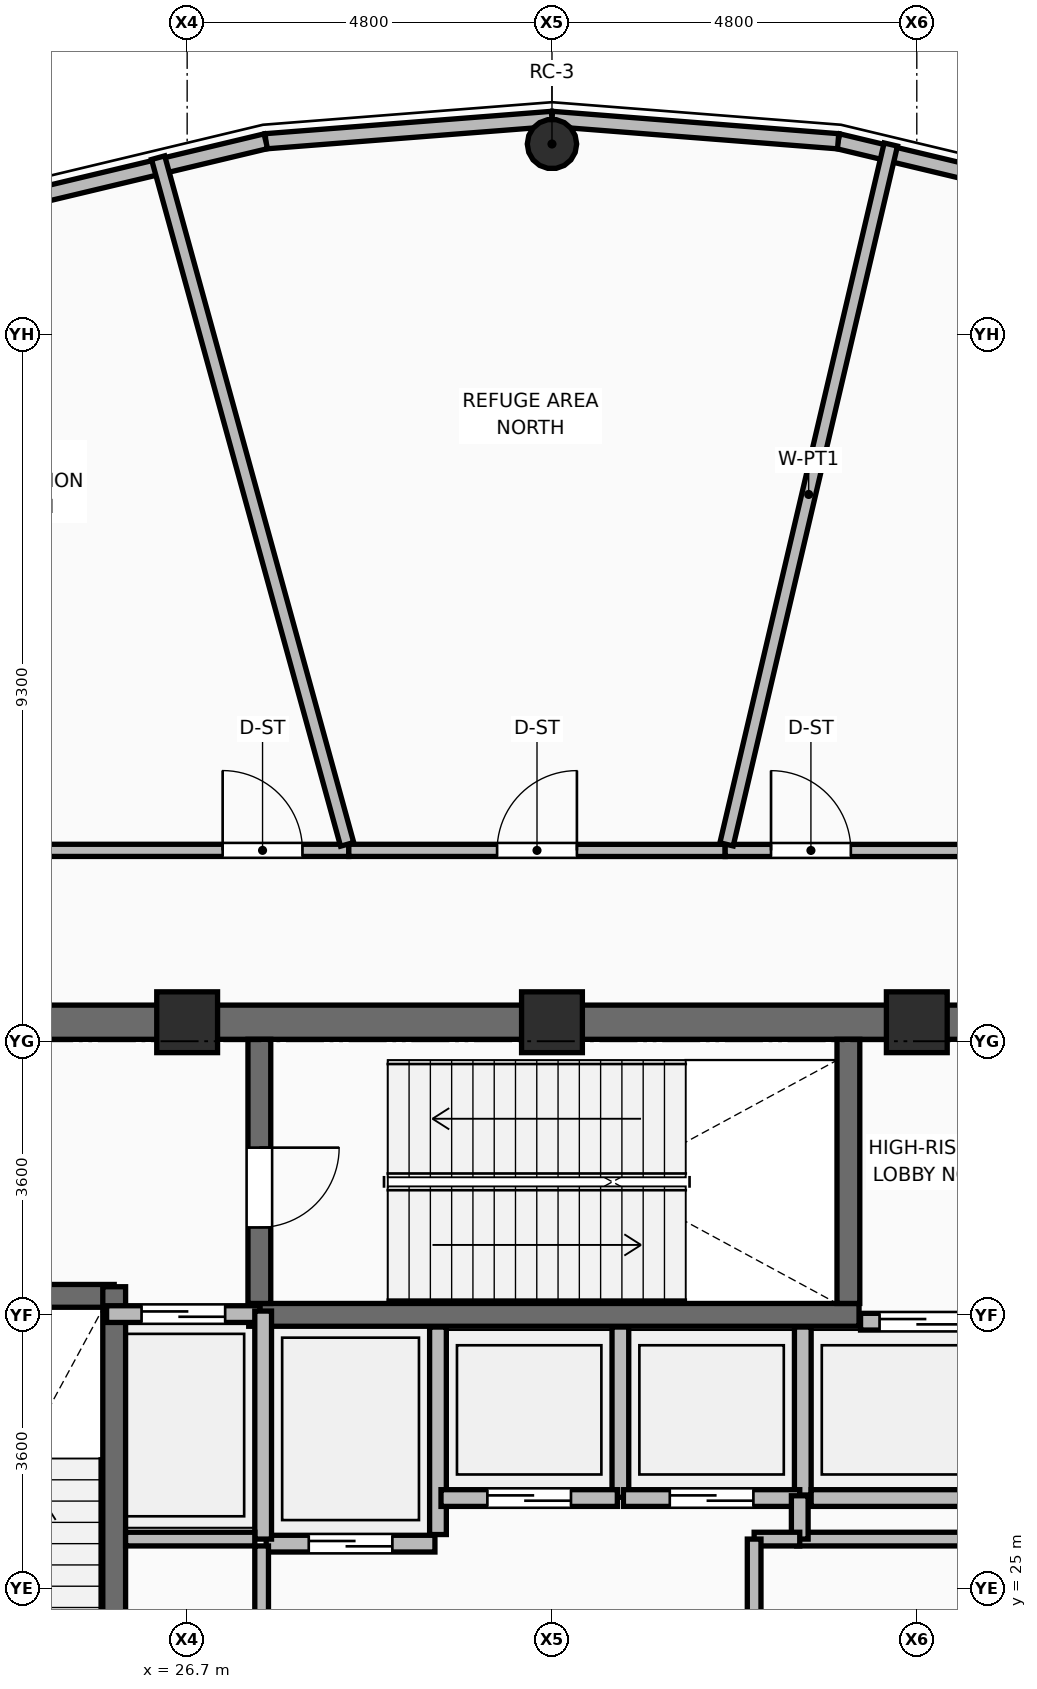
"""IFC4 building model, lengths in metres.
Left out: names, types, materials, properties, quantities, classifications, styles, units other than length and angle.
Written with IfcOpenShell. Run it as: python <this file> out.ifc"""

import sys

from ifc_helpers import new_model, si_unit, direction, frame, frame_2d, origin, origin_2d, place, context, subcontext, project, spatial, rectangle, hollow_circle, extrude, element, fill, save


model = new_model("IFC4")
c1 = context("Model", 3, precision=1e-05, world=origin(), true_north=direction((0.0, 1.0)))
c2 = subcontext(c1, "Body", "Model", "MODEL_VIEW")
j1 = project(units=[si_unit("LENGTHUNIT", "METRE"), si_unit("PLANEANGLEUNIT", "RADIAN")], contexts=[c1])
p1 = place(None, origin())
s1 = spatial("IfcSite", under=j1, at=p1, CompositionType="ELEMENT")
p2 = place(p1, origin())
s2 = spatial("IfcBuilding", under=s1, at=p2, CompositionType="ELEMENT")
p3 = place(p2, frame((0.0, 0.0, 253.65)))
s3 = spatial("IfcBuildingStorey", under=s2, at=p3, CompositionType="ELEMENT", Elevation=253.65)
for number, where, z_axis, x_axis in (
    (1, (26.7, 32.45, 0.0), (0.0, 0.0, 1.0), (1.0, 0.0, 0.0)),
    (2, (31.5, 32.45, 0.0), (0.0, 0.0, 1.0), (1.0, 0.0, 0.0)),
    (3, (36.3, 32.45, 0.0), (0.0, 0.0, 1.0), (1.0, 0.0, 0.0)),
):
    element("IfcColumn", number, at=place(p3, frame(where, z_axis=z_axis, x_axis=x_axis)), inside=s3, PredefinedType="COLUMN", context=c2, shape_type="SweptSolid", body=[
        extrude(rectangle(XDim=0.8, YDim=0.8, at=origin_2d()), origin(), (0.0, 0.0, 1.0), 5.4),
    ])
p4 = place(p3, frame((31.5, 44.004, 0.0), z_axis=(0.0, -0.232870617918, 0.972507725065), x_axis=(1.0, 0.0, 0.0)))
e4 = element("IfcColumn", 4, at=p4, inside=s3, PredefinedType="COLUMN", context=c2, shape_type="SweptSolid", body=[
    extrude(hollow_circle(Radius=0.325, WallThickness=0.03, at=origin_2d()), origin(), (0.0, 0.0, 1.0), 5.368),
])
p5 = place(p3, frame((30.0, 25.71, 0.0), z_axis=(0.0, 0.0, 1.0), x_axis=(0.0, 1.0, 0.0)))
e5 = element("IfcWall", 5, at=p5, inside=s3, PredefinedType="PARTITIONING", context=c2, shape_type="SweptSolid", body=[
    extrude(rectangle(XDim=2.73, YDim=0.22, at=frame_2d((1.365, 0.0))), origin(), (0.0, 0.0, 1.0), 5.195),
])
p6 = place(p3, frame((32.4, 26.2, 0.0), z_axis=(0.0, 0.0, 1.0), x_axis=(0.0, 1.0, 0.0)))
e6 = element("IfcWall", 6, at=p6, inside=s3, PredefinedType="PARTITIONING", context=c2, shape_type="SweptSolid", body=[
    extrude(rectangle(XDim=2.24, YDim=0.22, at=frame_2d((1.12, 0.0))), origin(), (0.0, 0.0, 1.0), 5.195),
])
p7 = place(p3, frame((34.8, 26.23, 0.0), z_axis=(0.0, 0.0, 1.0), x_axis=(0.0, 1.0, 0.0)))
e7 = element("IfcWall", 7, at=p7, inside=s3, PredefinedType="PARTITIONING", context=c2, shape_type="SweptSolid", body=[
    extrude(rectangle(XDim=2.21, YDim=0.22, at=frame_2d((1.105, 0.0))), origin(), (0.0, 0.0, 1.0), 5.195),
])
p8 = place(p3, frame((34.91, 26.19, 0.0), z_axis=(0.0, 0.0, 1.0), x_axis=(1.0, 0.0, 0.0)))
e8 = element("IfcWall", 8, at=p8, inside=s3, PredefinedType="PARTITIONING", context=c2, shape_type="SweptSolid", body=[
    extrude(rectangle(XDim=2.14, YDim=0.22, at=frame_2d((1.07, 0.0))), origin(), (0.0, 0.0, 1.0), 5.195),
])
p9 = place(p3, frame((38.915, 43.168, 0.0), z_axis=(0.0, 0.0, 1.0), x_axis=(-0.972626535049, 0.23237388691, 0.0)))
e9 = element("IfcWall", 9, at=p9, inside=s3, PredefinedType="PARAPET", context=c2, shape_type="SweptSolid", body=[
    extrude(rectangle(XDim=3.753, YDim=0.2, at=frame_2d((1.876, 0.0))), origin(), (0.0, 0.0, 1.0), 1.12),
])
for number, where, z_axis, x_axis in (
    (10, (35.265, 44.04, 0.0), (0.0, 0.0, 1.0), (-0.997, 0.078, 0.0)),
    (11, (31.5, 44.334, 0.0), (0.0, 0.0, 1.0), (-0.997, -0.078, 0.0)),
):
    element("IfcWall", number, at=place(p3, frame(where, z_axis=z_axis, x_axis=x_axis)), inside=s3, PredefinedType="PARAPET", context=c2, shape_type="SweptSolid", body=[
        extrude(rectangle(XDim=3.776, YDim=0.2, at=frame_2d((1.888, 0.0))), origin(), (0.0, 0.0, 1.0), 1.12),
    ])
p10 = place(p3, frame((27.735, 44.04, 0.0), z_axis=(0.0, 0.0, 1.0), x_axis=(-0.972626535049, -0.23237388691, 0.0)))
e12 = element("IfcWall", 12, at=p10, inside=s3, PredefinedType="PARAPET", context=c2, shape_type="SweptSolid", body=[
    extrude(rectangle(XDim=3.753, YDim=0.2, at=frame_2d((1.876, 0.0))), origin(), (0.0, 0.0, 1.0), 1.12),
])
p11 = place(p3, frame((21.675, 32.45, 0.0), z_axis=(0.0, 0.0, 1.0), x_axis=(1.0, 0.0, 0.0)))
e13 = element("IfcWall", 13, at=p11, inside=s3, PredefinedType="SHEAR", context=c2, shape_type="SweptSolid", body=[
    extrude(rectangle(XDim=19.65, YDim=0.45, at=frame_2d((9.825, 0.0))), origin(), (0.0, 0.0, 1.0), 5.22),
])
p12 = place(p11, frame((2.075, 0.0, 0.0)))
e14 = element("IfcOpeningElement", 14, at=p12, cuts=e13, PredefinedType="OPENING", context=c2, shape_type="SweptSolid", body=[
    extrude(rectangle(XDim=1.1, YDim=2.1, at=frame_2d((0.55, 1.05))), frame((0.0, 0.235, 0.0), z_axis=(0.0, -1.0, 0.0), x_axis=(1.0, 0.0, 0.0)), (0.0, 0.0, 1.0), 0.47),
])
p13 = place(p11, frame((15.465, 0.0, 0.0)))
e15 = element("IfcOpeningElement", 15, at=p13, cuts=e13, PredefinedType="OPENING", context=c2, shape_type="SweptSolid", body=[
    extrude(rectangle(XDim=1.0, YDim=2.1, at=frame_2d((0.5, 1.05))), frame((0.0, 0.235, 0.0), z_axis=(0.0, -1.0, 0.0), x_axis=(1.0, 0.0, 0.0)), (0.0, 0.0, 1.0), 0.47),
])
p14 = place(p11, frame((17.475, 0.0, 0.0)))
e16 = element("IfcOpeningElement", 16, at=p14, cuts=e13, PredefinedType="OPENING", context=c2, shape_type="SweptSolid", body=[
    extrude(rectangle(XDim=0.9, YDim=2.1, at=frame_2d((0.45, 1.05))), frame((0.0, 0.235, 0.0), z_axis=(0.0, -1.0, 0.0), x_axis=(1.0, 0.0, 0.0)), (0.0, 0.0, 1.0), 0.47),
])
p15 = place(p3, frame((22.125, 28.85, 0.0), z_axis=(0.0, 0.0, 1.0), x_axis=(1.0, 0.0, 0.0)))
e17 = element("IfcWall", 17, at=p15, inside=s3, PredefinedType="SHEAR", context=c2, shape_type="SweptSolid", body=[
    extrude(rectangle(XDim=3.615, YDim=0.3, at=frame_2d((1.808, 0.0))), origin(), (0.0, 0.0, 1.0), 5.22),
])
p16 = place(p3, frame((25.74, 20.98, 0.0), z_axis=(0.0, 0.0, 1.0), x_axis=(0.0, 1.0, 0.0)))
e18 = element("IfcWall", 18, at=p16, inside=s3, PredefinedType="SHEAR", context=c2, shape_type="SweptSolid", body=[
    extrude(rectangle(XDim=7.99, YDim=0.3, at=frame_2d((3.995, 0.0))), origin(), (0.0, 0.0, 1.0), 5.22),
])
p17 = place(p3, frame((27.51, 28.6, 0.0), z_axis=(0.0, 0.0, 1.0), x_axis=(1.0, 0.0, 0.0)))
e19 = element("IfcWall", 19, at=p17, inside=s3, PredefinedType="SHEAR", context=c2, shape_type="SweptSolid", body=[
    extrude(rectangle(XDim=8.03, YDim=0.3, at=frame_2d((4.015, 0.0))), origin(), (0.0, 0.0, 1.0), 5.22),
])
p18 = place(p3, frame((27.65, 28.75, 0.0), z_axis=(0.0, 0.0, 1.0), x_axis=(0.0, 1.0, 0.0)))
e20 = element("IfcWall", 20, at=p18, inside=s3, PredefinedType="SHEAR", context=c2, shape_type="SweptSolid", body=[
    extrude(rectangle(XDim=3.475, YDim=0.3, at=frame_2d((1.738, 0.0))), origin(), (0.0, 0.0, 1.0), 5.22),
])
p19 = place(p18, frame((1.0, 0.0, 0.0)))
e21 = element("IfcOpeningElement", 21, at=p19, cuts=e20, PredefinedType="OPENING", context=c2, shape_type="SweptSolid", body=[
    extrude(rectangle(XDim=1.05, YDim=2.1, at=frame_2d((0.525, 1.05))), frame((0.0, 0.16, 0.0), z_axis=(0.0, -1.0, 0.0), x_axis=(1.0, 0.0, 0.0)), (0.0, 0.0, 1.0), 0.32),
])
p20 = place(p3, frame((35.4, 28.75, 0.0), z_axis=(0.0, 0.0, 1.0), x_axis=(0.0, 1.0, 0.0)))
e22 = element("IfcWall", 22, at=p20, inside=s3, PredefinedType="SHEAR", context=c2, shape_type="SweptSolid", body=[
    extrude(rectangle(XDim=3.475, YDim=0.3, at=frame_2d((1.738, 0.0))), origin(), (0.0, 0.0, 1.0), 5.22),
])
p21 = place(p3, frame((25.64, 28.61, 0.0), z_axis=(0.0, 0.0, 1.0), x_axis=(1.0, 0.0, 0.0)))
e23 = element("IfcWall", 23, at=p21, inside=s3, PredefinedType="PARTITIONING", context=c2, shape_type="SweptSolid", body=[
    extrude(rectangle(XDim=2.02, YDim=0.22, at=frame_2d((1.01, 0.0))), origin(), (0.0, 0.0, 1.0), 5.2),
])
p22 = place(p21, frame((0.46, 0.0, 0.0)))
e24 = element("IfcOpeningElement", 24, at=p22, cuts=e23, PredefinedType="OPENING", context=c2, shape_type="SweptSolid", body=[
    extrude(rectangle(XDim=1.1, YDim=2.2, at=frame_2d((0.55, 1.1))), frame((0.0, 0.12, 0.0), z_axis=(0.0, -1.0, 0.0), x_axis=(1.0, 0.0, 0.0)), (0.0, 0.0, 1.0), 0.24),
])
p23 = place(p3, frame((27.74, 25.59, 0.0), z_axis=(0.0, 0.0, 1.0), x_axis=(1.0, 0.0, 0.0)))
e25 = element("IfcWall", 25, at=p23, inside=s3, PredefinedType="PARTITIONING", context=c2, shape_type="SweptSolid", body=[
    extrude(rectangle(XDim=2.22, YDim=0.22, at=frame_2d((1.11, 0.0))), origin(), (0.0, 0.0, 1.0), 5.2),
])
p24 = place(p23, frame((0.56, 0.0, 0.0)))
e26 = element("IfcOpeningElement", 26, at=p24, cuts=e25, PredefinedType="OPENING", context=c2, shape_type="SweptSolid", body=[
    extrude(rectangle(XDim=1.1, YDim=2.2, at=frame_2d((0.55, 1.1))), frame((0.0, 0.12, 0.0), z_axis=(0.0, -1.0, 0.0), x_axis=(1.0, 0.0, 0.0)), (0.0, 0.0, 1.0), 0.24),
])
p25 = place(p3, frame((30.04, 26.19, 0.0), z_axis=(0.0, 0.0, 1.0), x_axis=(1.0, 0.0, 0.0)))
e27 = element("IfcWall", 27, at=p25, inside=s3, PredefinedType="PARTITIONING", context=c2, shape_type="SweptSolid", body=[
    extrude(rectangle(XDim=2.32, YDim=0.22, at=frame_2d((1.16, 0.0))), origin(), (0.0, 0.0, 1.0), 5.2),
])
p26 = place(p25, frame((0.61, 0.0, 0.0)))
e28 = element("IfcOpeningElement", 28, at=p26, cuts=e27, PredefinedType="OPENING", context=c2, shape_type="SweptSolid", body=[
    extrude(rectangle(XDim=1.1, YDim=2.2, at=frame_2d((0.55, 1.1))), frame((0.0, 0.12, 0.0), z_axis=(0.0, -1.0, 0.0), x_axis=(1.0, 0.0, 0.0)), (0.0, 0.0, 1.0), 0.24),
])
p27 = place(p3, frame((32.44, 26.19, 0.0), z_axis=(0.0, 0.0, 1.0), x_axis=(1.0, 0.0, 0.0)))
e29 = element("IfcWall", 29, at=p27, inside=s3, PredefinedType="PARTITIONING", context=c2, shape_type="SweptSolid", body=[
    extrude(rectangle(XDim=2.32, YDim=0.22, at=frame_2d((1.16, 0.0))), origin(), (0.0, 0.0, 1.0), 5.2),
])
p28 = place(p27, frame((0.61, 0.0, 0.0)))
e30 = element("IfcOpeningElement", 30, at=p28, cuts=e29, PredefinedType="OPENING", context=c2, shape_type="SweptSolid", body=[
    extrude(rectangle(XDim=1.1, YDim=2.2, at=frame_2d((0.55, 1.1))), frame((0.0, 0.12, 0.0), z_axis=(0.0, -1.0, 0.0), x_axis=(1.0, 0.0, 0.0)), (0.0, 0.0, 1.0), 0.24),
])
p29 = place(p3, frame((35.56, 28.51, 0.0), z_axis=(0.0, 0.0, 1.0), x_axis=(1.0, 0.0, 0.0)))
e31 = element("IfcWall", 31, at=p29, inside=s3, PredefinedType="PARTITIONING", context=c2, shape_type="SweptSolid", body=[
    extrude(rectangle(XDim=1.6, YDim=0.22, at=frame_2d((0.8, 0.0))), origin(), (0.0, 0.0, 1.0), 5.2),
])
p30 = place(p29, frame((0.25, 0.0, 0.0)))
e32 = element("IfcOpeningElement", 32, at=p30, cuts=e31, PredefinedType="OPENING", context=c2, shape_type="SweptSolid", body=[
    extrude(rectangle(XDim=1.1, YDim=2.2, at=frame_2d((0.55, 1.1))), frame((0.0, 0.12, 0.0), z_axis=(0.0, -1.0, 0.0), x_axis=(1.0, 0.0, 0.0)), (0.0, 0.0, 1.0), 0.24),
])
p31 = place(p3, frame((27.7, 25.65, 0.0), z_axis=(0.0, 0.0, 1.0), x_axis=(0.0, 1.0, 0.0)))
e33 = element("IfcWall", 33, at=p31, inside=s3, PredefinedType="PARTITIONING", context=c2, shape_type="SweptSolid", body=[
    extrude(rectangle(XDim=3.0, YDim=0.22, at=frame_2d((1.5, 0.0))), origin(), (0.0, 0.0, 1.0), 5.2),
])
p32 = place(p3, frame((25.89, 25.65, 0.0), z_axis=(0.0, 0.0, 1.0), x_axis=(1.0, 0.0, 0.0)))
e34 = element("IfcWall", 34, at=p32, inside=s3, PredefinedType="PARTITIONING", context=c2, shape_type="SweptSolid", body=[
    extrude(rectangle(XDim=1.7, YDim=0.18, at=frame_2d((0.85, 0.0))), origin(), (0.0, 0.0, 1.0), 5.2),
])
p33 = place(p3, frame((27.68, 24.16, 0.0), z_axis=(0.0, 0.0, 1.0), x_axis=(0.0, 1.0, 0.0)))
e35 = element("IfcWall", 35, at=p33, inside=s3, PredefinedType="PARTITIONING", context=c2, shape_type="SweptSolid", body=[
    extrude(rectangle(XDim=1.4, YDim=0.18, at=frame_2d((0.7, 0.0))), origin(), (0.0, 0.0, 1.0), 5.2),
])
p34 = place(p3, frame((34.72, 25.65, 0.0), z_axis=(0.0, 0.0, 1.0), x_axis=(1.0, 0.0, 0.0)))
e36 = element("IfcWall", 36, at=p34, inside=s3, PredefinedType="PARTITIONING", context=c2, shape_type="SweptSolid", body=[
    extrude(rectangle(XDim=2.34, YDim=0.18, at=frame_2d((1.17, 0.0))), origin(), (0.0, 0.0, 1.0), 5.2),
])
p35 = place(p3, frame((34.76, 25.65, 0.0), z_axis=(0.0, 0.0, 1.0), x_axis=(0.0, 1.0, 0.0)))
e37 = element("IfcWall", 37, at=p35, inside=s3, PredefinedType="PARTITIONING", context=c2, shape_type="SweptSolid", body=[
    extrude(rectangle(XDim=0.57, YDim=0.22, at=frame_2d((0.285, 0.0))), origin(), (0.0, 0.0, 1.0), 5.2),
])
p36 = place(p3, frame((34.16, 25.65, 0.0), z_axis=(0.0, 0.0, 1.0), x_axis=(1.0, 0.0, 0.0)))
e38 = element("IfcWall", 38, at=p36, inside=s3, PredefinedType="PARTITIONING", context=c2, shape_type="SweptSolid", body=[
    extrude(rectangle(XDim=0.6, YDim=0.18, at=frame_2d((0.3, 0.0))), origin(), (0.0, 0.0, 1.0), 5.2),
])
p37 = place(p3, frame((34.16, 21.1, 0.0), z_axis=(0.0, 0.0, 1.0), x_axis=(0.0, 1.0, 0.0)))
e39 = element("IfcWall", 39, at=p37, inside=s3, PredefinedType="PARTITIONING", context=c2, shape_type="SweptSolid", body=[
    extrude(rectangle(XDim=4.55, YDim=0.18, at=frame_2d((2.275, 0.0))), origin(), (0.0, 0.0, 1.0), 5.2),
])
p38 = place(p37, frame((1.825, 0.0, 0.0)))
e40 = element("IfcOpeningElement", 40, at=p38, cuts=e39, PredefinedType="OPENING", context=c2, shape_type="SweptSolid", body=[
    extrude(rectangle(XDim=0.9, YDim=2.1, at=frame_2d((0.45, 1.05))), frame((0.0, 0.1, 0.0), z_axis=(0.0, -1.0, 0.0), x_axis=(1.0, 0.0, 0.0)), (0.0, 0.0, 1.0), 0.2),
])
p39 = place(p3, frame((23.711, 34.711, 0.0), z_axis=(0.0, 0.0, 1.0), x_axis=(1.0, 0.0, 0.0)))
e41 = element("IfcWall", 41, at=p39, inside=s3, PredefinedType="PARTITIONING", context=c2, shape_type="SweptSolid", body=[
    extrude(rectangle(XDim=5.116, YDim=0.16, at=frame_2d((2.558, 0.0))), origin(), (0.0, 0.0, 1.0), 5.2),
])
p40 = place(p39, frame((3.456, 0.0, 0.0)))
e42 = element("IfcOpeningElement", 42, at=p40, cuts=e41, PredefinedType="OPENING", context=c2, shape_type="SweptSolid", body=[
    extrude(rectangle(XDim=1.05, YDim=2.1, at=frame_2d((0.525, 1.05))), frame((0.0, 0.09, 0.0), z_axis=(0.0, -1.0, 0.0), x_axis=(1.0, 0.0, 0.0)), (0.0, 0.0, 1.0), 0.18),
])
p41 = place(p3, frame((28.827, 34.711, 0.0), z_axis=(0.0, 0.0, 1.0), x_axis=(0.999999980556, -0.00019719976, 0.0)))
e43 = element("IfcWall", 43, at=p41, inside=s3, PredefinedType="PARTITIONING", context=c2, shape_type="SweptSolid", body=[
    extrude(rectangle(XDim=4.952, YDim=0.16, at=frame_2d((2.476, 0.0))), origin(), (0.0, 0.0, 1.0), 4.733),
])
p42 = place(p41, frame((1.951, 0.0, 0.0)))
e44 = element("IfcOpeningElement", 44, at=p42, cuts=e43, PredefinedType="OPENING", context=c2, shape_type="SweptSolid", body=[
    extrude(rectangle(XDim=1.05, YDim=2.1, at=frame_2d((0.525, 1.05))), frame((0.0, 0.09, 0.0), z_axis=(0.0, -1.0, 0.0), x_axis=(1.0, 0.0, 0.0)), (0.0, 0.0, 1.0), 0.18),
])
p43 = place(p3, frame((33.779, 34.71, 0.0), z_axis=(0.0, 0.0, 1.0), x_axis=(0.999999984288, -0.000177265674, 0.0)))
e45 = element("IfcWall", 45, at=p43, inside=s3, PredefinedType="PARTITIONING", context=c2, shape_type="SweptSolid", body=[
    extrude(rectangle(XDim=5.509, YDim=0.16, at=frame_2d((2.754, 0.0))), origin(), (0.0, 0.0, 1.0), 5.2),
])
p44 = place(p43, frame((0.603, 0.0, 0.0)))
e46 = element("IfcOpeningElement", 46, at=p44, cuts=e45, PredefinedType="OPENING", context=c2, shape_type="SweptSolid", body=[
    extrude(rectangle(XDim=1.05, YDim=2.1, at=frame_2d((0.525, 1.05))), frame((0.0, 0.09, 0.0), z_axis=(0.0, -1.0, 0.0), x_axis=(1.0, 0.0, 0.0)), (0.0, 0.0, 1.0), 0.18),
])
p45 = place(p3, frame((33.797, 34.79, 0.0), z_axis=(0.0, 0.0, 1.0), x_axis=(0.22849108233, 0.973546005742, 0.0)))
e47 = element("IfcWall", 47, at=p45, inside=s3, PredefinedType="PARTITIONING", context=c2, shape_type="SweptSolid", body=[
    extrude(rectangle(XDim=9.457, YDim=0.18, at=frame_2d((4.729, 0.0))), origin(), (0.0, 0.0, 1.0), 4.575),
])
p46 = place(p3, frame((28.805, 34.79, 0.0), z_axis=(0.0, 0.0, 1.0), x_axis=(-0.265402950907, 0.96413758025, 0.0)))
e48 = element("IfcWall", 48, at=p46, inside=s3, PredefinedType="PARTITIONING", context=c2, shape_type="SweptSolid", body=[
    extrude(rectangle(XDim=9.37, YDim=0.18, at=frame_2d((4.685, 0.0))), origin(), (0.0, 0.0, 1.0), 4.575),
])
p47 = place(p19, frame((1.05, 0.0, 0.0), z_axis=(0.0, 0.0, 1.0), x_axis=(-1.0, 0.0, 0.0)))
e49 = element("IfcDoor", 49, at=p47, inside=s3, OperationType="SINGLE_SWING_LEFT", PredefinedType="DOOR", context=c2, shape_type="SweptSolid", body=[
    extrude(rectangle(XDim=1.05, YDim=2.1, at=frame_2d((0.525, 1.05))), frame((0.0, 0.025, 0.0), z_axis=(0.0, -1.0, 0.0), x_axis=(1.0, 0.0, 0.0)), (0.0, 0.0, 1.0), 0.05),
])
fill(e21, e49)
p48 = place(p22, origin())
e50 = element("IfcDoor", 50, at=p48, inside=s3, OperationType="DOUBLE_DOOR_SLIDING", PredefinedType="DOOR", context=c2, shape_type="SweptSolid", body=[
    extrude(rectangle(XDim=1.1, YDim=2.2, at=frame_2d((0.55, 1.1))), frame((0.0, 0.025, 0.0), z_axis=(0.0, -1.0, 0.0), x_axis=(1.0, 0.0, 0.0)), (0.0, 0.0, 1.0), 0.05),
])
fill(e24, e50)
p49 = place(p24, frame((1.1, 0.0, 0.0), z_axis=(0.0, 0.0, 1.0), x_axis=(-1.0, 0.0, 0.0)))
e51 = element("IfcDoor", 51, at=p49, inside=s3, OperationType="DOUBLE_DOOR_SLIDING", PredefinedType="DOOR", context=c2, shape_type="SweptSolid", body=[
    extrude(rectangle(XDim=1.1, YDim=2.2, at=frame_2d((0.55, 1.1))), frame((0.0, 0.025, 0.0), z_axis=(0.0, -1.0, 0.0), x_axis=(1.0, 0.0, 0.0)), (0.0, 0.0, 1.0), 0.05),
])
fill(e26, e51)
p50 = place(p26, frame((1.1, 0.0, 0.0), z_axis=(0.0, 0.0, 1.0), x_axis=(-1.0, 0.0, 0.0)))
e52 = element("IfcDoor", 52, at=p50, inside=s3, OperationType="DOUBLE_DOOR_SLIDING", PredefinedType="DOOR", context=c2, shape_type="SweptSolid", body=[
    extrude(rectangle(XDim=1.1, YDim=2.2, at=frame_2d((0.55, 1.1))), frame((0.0, 0.025, 0.0), z_axis=(0.0, -1.0, 0.0), x_axis=(1.0, 0.0, 0.0)), (0.0, 0.0, 1.0), 0.05),
])
fill(e28, e52)
p51 = place(p28, frame((1.1, 0.0, 0.0), z_axis=(0.0, 0.0, 1.0), x_axis=(-1.0, 0.0, 0.0)))
e53 = element("IfcDoor", 53, at=p51, inside=s3, OperationType="DOUBLE_DOOR_SLIDING", PredefinedType="DOOR", context=c2, shape_type="SweptSolid", body=[
    extrude(rectangle(XDim=1.1, YDim=2.2, at=frame_2d((0.55, 1.1))), frame((0.0, 0.025, 0.0), z_axis=(0.0, -1.0, 0.0), x_axis=(1.0, 0.0, 0.0)), (0.0, 0.0, 1.0), 0.05),
])
fill(e30, e53)
p52 = place(p30, origin())
e54 = element("IfcDoor", 54, at=p52, inside=s3, OperationType="DOUBLE_DOOR_SLIDING", PredefinedType="DOOR", context=c2, shape_type="SweptSolid", body=[
    extrude(rectangle(XDim=1.1, YDim=2.2, at=frame_2d((0.55, 1.1))), frame((0.0, 0.025, 0.0), z_axis=(0.0, -1.0, 0.0), x_axis=(1.0, 0.0, 0.0)), (0.0, 0.0, 1.0), 0.05),
])
fill(e32, e54)
p53 = place(p44, origin())
e55 = element("IfcDoor", 55, at=p53, inside=s3, OperationType="SINGLE_SWING_LEFT", PredefinedType="DOOR", context=c2, shape_type="SweptSolid", body=[
    extrude(rectangle(XDim=1.05, YDim=2.1, at=frame_2d((0.525, 1.05))), frame((0.0, 0.025, 0.0), z_axis=(0.0, -1.0, 0.0), x_axis=(1.0, 0.0, 0.0)), (0.0, 0.0, 1.0), 0.05),
])
fill(e46, e55)
p54 = place(p42, origin())
e56 = element("IfcDoor", 56, at=p54, inside=s3, OperationType="SINGLE_SWING_RIGHT", PredefinedType="DOOR", context=c2, shape_type="SweptSolid", body=[
    extrude(rectangle(XDim=1.05, YDim=2.1, at=frame_2d((0.525, 1.05))), frame((0.0, 0.025, 0.0), z_axis=(0.0, -1.0, 0.0), x_axis=(1.0, 0.0, 0.0)), (0.0, 0.0, 1.0), 0.05),
])
fill(e44, e56)
p55 = place(p40, origin())
e57 = element("IfcDoor", 57, at=p55, inside=s3, OperationType="SINGLE_SWING_LEFT", PredefinedType="DOOR", context=c2, shape_type="SweptSolid", body=[
    extrude(rectangle(XDim=1.05, YDim=2.1, at=frame_2d((0.525, 1.05))), frame((0.0, 0.025, 0.0), z_axis=(0.0, -1.0, 0.0), x_axis=(1.0, 0.0, 0.0)), (0.0, 0.0, 1.0), 0.05),
])
fill(e42, e57)
save(model, sys.argv[1])
